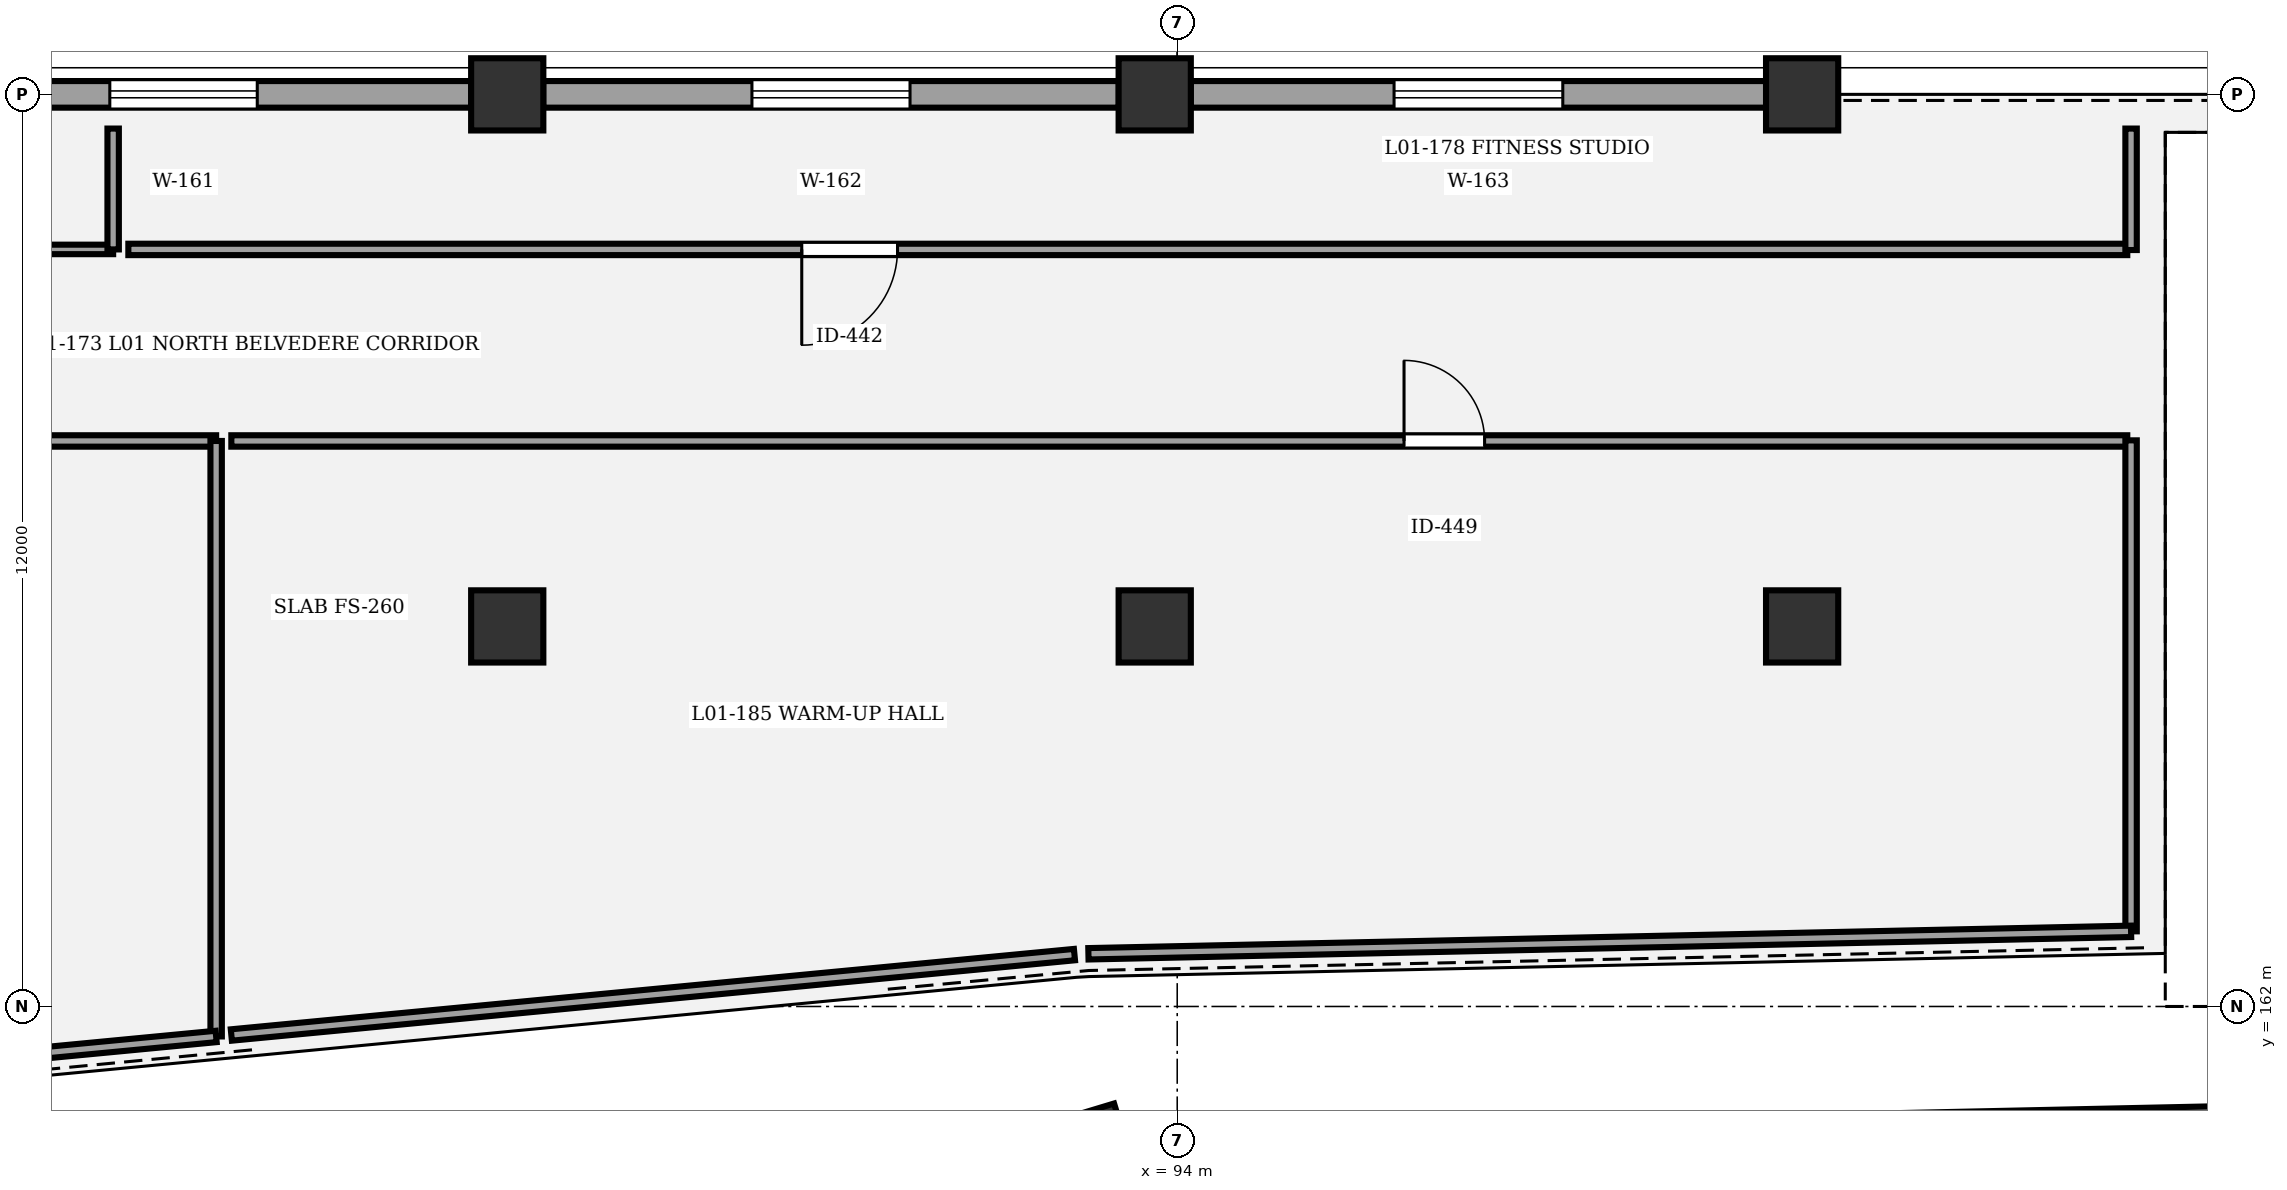
"""IFC4 building model, lengths in metres.
Left out: names, types, materials, properties, quantities, classifications, styles, units other than length and angle.
Written with IfcOpenShell. Run it as: python <this file> out.ifc"""

import sys

from ifc_helpers import new_model, si_unit, direction, frame, frame_2d, origin, origin_2d, place, context, subcontext, project, spatial, rectangle, circle, extrude, element, fill, save


model = new_model("IFC4")
c1 = context("Model", 3, precision=1e-05, world=origin(), true_north=direction((0.0, 1.0)))
c2 = subcontext(c1, "Body", "Model", "MODEL_VIEW")
j1 = project(units=[si_unit("LENGTHUNIT", "METRE"), si_unit("PLANEANGLEUNIT", "RADIAN")], contexts=[c1])
p1 = place(None, origin())
s1 = spatial("IfcSite", under=j1, at=p1, CompositionType="ELEMENT")
p2 = place(p1, origin())
s2 = spatial("IfcBuilding", under=s1, at=p2, CompositionType="ELEMENT")
p3 = place(p2, frame((0.0, 0.0, 5.4)))
s3 = spatial("IfcBuildingStorey", under=s2, at=p3, CompositionType="ELEMENT", Elevation=5.4)
p4 = place(p3, frame((92.885, 160.194, 0.0), z_axis=(0.0, 0.0, 1.0), x_axis=(-0.289198876314, 0.957269037387, 0.0)))
e1 = element("IfcColumn", 1, at=p4, inside=s3, PredefinedType="COLUMN", context=c2, shape_type="SweptSolid", body=[
    extrude(rectangle(XDim=0.85, YDim=0.85, at=origin_2d()), origin(), (0.0, 0.0, 1.0), 4.8),
])
for number, where, z_axis, x_axis in (
    (2, (85.185, 167.0, 0.0), (0.0, 0.0, 1.0), (1.0, 0.0, 0.0)),
    (3, (85.185, 174.0, 0.0), (0.0, 0.0, 1.0), (1.0, 0.0, 0.0)),
    (4, (93.704, 167.0, 0.0), (0.0, 0.0, 1.0), (1.0, 0.0, 0.0)),
    (5, (93.704, 174.0, 0.0), (0.0, 0.0, 1.0), (1.0, 0.0, 0.0)),
    (6, (102.222, 167.0, 0.0), (0.0, 0.0, 1.0), (1.0, 0.0, 0.0)),
    (7, (102.222, 174.0, 0.0), (0.0, 0.0, 1.0), (1.0, 0.0, 0.0)),
):
    element("IfcColumn", number, at=place(p3, frame(where, z_axis=z_axis, x_axis=x_axis)), inside=s3, PredefinedType="COLUMN", context=c2, shape_type="SweptSolid", body=[
        extrude(circle(Radius=0.475, at=origin_2d()), origin(), (0.0, 0.0, 1.0), 4.8),
    ])
p5 = place(p3, frame((114.577, 160.661, 0.0), z_axis=(0.0, 0.0, 1.0), x_axis=(-0.999768218464, -0.021529267282, 0.0)))
e8 = element("IfcWall", 8, at=p5, inside=s3, PredefinedType="STANDARD", context=c2, shape_type="SweptSolid", body=[
    extrude(rectangle(XDim=21.274, YDim=0.35, at=frame_2d((10.637, 0.0))), origin(), (0.0, 0.0, 1.0), 3.57),
])
p6 = place(p5, frame((9.947, 0.0, 0.9)))
e9 = element("IfcOpeningElement", 9, at=p6, cuts=e8, PredefinedType="OPENING", context=c2, shape_type="SweptSolid", body=[
    extrude(rectangle(XDim=1.38, YDim=1.75, at=frame_2d((0.69, 0.875))), frame((0.0, 0.185, 0.0), z_axis=(0.0, -1.0, 0.0), x_axis=(1.0, 0.0, 0.0)), (0.0, 0.0, 1.0), 0.37),
])
p7 = place(p3, frame((77.14, 174.0, 0.0), z_axis=(0.0, 0.0, 1.0), x_axis=(1.0, 0.0, 0.0)))
e10 = element("IfcWall", 10, at=p7, inside=s3, PredefinedType="STANDARD", context=c2, shape_type="SweptSolid", body=[
    extrude(rectangle(XDim=7.572, YDim=0.35, at=frame_2d((3.786, 0.0))), origin(), (0.0, 0.0, 1.0), 3.56),
])
p8 = place(p7, frame((2.816, 0.0, 0.9)))
e11 = element("IfcOpeningElement", 11, at=p8, cuts=e10, PredefinedType="OPENING", context=c2, shape_type="SweptSolid", body=[
    extrude(rectangle(XDim=1.94, YDim=1.95, at=frame_2d((0.97, 0.975))), frame((0.0, 0.185, 0.0), z_axis=(0.0, -1.0, 0.0), x_axis=(1.0, 0.0, 0.0)), (0.0, 0.0, 1.0), 0.37),
])
p9 = place(p3, frame((85.658, 174.0, 0.0), z_axis=(0.0, 0.0, 1.0), x_axis=(1.0, 0.0, 0.0)))
e12 = element("IfcWall", 12, at=p9, inside=s3, PredefinedType="STANDARD", context=c2, shape_type="SweptSolid", body=[
    extrude(rectangle(XDim=7.573, YDim=0.35, at=frame_2d((3.787, 0.0))), origin(), (0.0, 0.0, 1.0), 3.56),
])
p10 = place(p9, frame((2.747, 0.0, 0.9)))
e13 = element("IfcOpeningElement", 13, at=p10, cuts=e12, PredefinedType="OPENING", context=c2, shape_type="SweptSolid", body=[
    extrude(rectangle(XDim=2.08, YDim=1.95, at=frame_2d((1.04, 0.975))), frame((0.0, 0.185, 0.0), z_axis=(0.0, -1.0, 0.0), x_axis=(1.0, 0.0, 0.0)), (0.0, 0.0, 1.0), 0.37),
])
p11 = place(p3, frame((94.177, 174.0, 0.0), z_axis=(0.0, 0.0, 1.0), x_axis=(1.0, 0.0, 0.0)))
e14 = element("IfcWall", 14, at=p11, inside=s3, PredefinedType="STANDARD", context=c2, shape_type="SweptSolid", body=[
    extrude(rectangle(XDim=7.572, YDim=0.35, at=frame_2d((3.786, 0.0))), origin(), (0.0, 0.0, 1.0), 3.56),
])
p12 = place(p11, frame((2.676, 0.0, 0.9)))
e15 = element("IfcOpeningElement", 15, at=p12, cuts=e14, PredefinedType="OPENING", context=c2, shape_type="SweptSolid", body=[
    extrude(rectangle(XDim=2.22, YDim=1.95, at=frame_2d((1.11, 0.975))), frame((0.0, 0.185, 0.0), z_axis=(0.0, -1.0, 0.0), x_axis=(1.0, 0.0, 0.0)), (0.0, 0.0, 1.0), 0.37),
])
p13 = place(p3, frame((80.0, 171.96, 0.0), z_axis=(0.0, 0.0, 1.0), x_axis=(-1.0, 0.0, 0.0)))
e16 = element("IfcWall", 16, at=p13, inside=s3, PredefinedType="PARTITIONING", context=c2, shape_type="SweptSolid", body=[
    extrude(rectangle(XDim=26.1, YDim=0.125, at=frame_2d((13.05, 0.0))), origin(), (0.0, 0.0, 1.0), 3.55),
])
p14 = place(p13, frame((16.076, 0.0, 0.0)))
e17 = element("IfcOpeningElement", 17, at=p14, cuts=e16, PredefinedType="OPENING", context=c2, shape_type="SweptSolid", body=[
    extrude(rectangle(XDim=1.22, YDim=2.1, at=frame_2d((0.61, 1.05))), frame((0.0, 0.073, 0.0), z_axis=(0.0, -1.0, 0.0), x_axis=(1.0, 0.0, 0.0)), (0.0, 0.0, 1.0), 0.145),
])
p15 = place(p3, frame((106.5, 171.96, 0.0), z_axis=(0.0, 0.0, 1.0), x_axis=(-1.0, 0.0, 0.0)))
e18 = element("IfcWall", 18, at=p15, inside=s3, PredefinedType="PARTITIONING", context=c2, shape_type="SweptSolid", body=[
    extrude(rectangle(XDim=26.3, YDim=0.15, at=frame_2d((13.15, 0.0))), origin(), (0.0, 0.0, 1.0), 3.55),
])
p16 = place(p15, frame((16.18, 0.0, 0.0)))
e19 = element("IfcOpeningElement", 19, at=p16, cuts=e18, PredefinedType="OPENING", context=c2, shape_type="SweptSolid", body=[
    extrude(rectangle(XDim=1.26, YDim=2.1, at=frame_2d((0.63, 1.05))), frame((0.0, 0.085, 0.0), z_axis=(0.0, -1.0, 0.0), x_axis=(1.0, 0.0, 0.0)), (0.0, 0.0, 1.0), 0.17),
])
p17 = place(p3, frame((56.36, 169.44, 0.0), z_axis=(0.0, 0.0, 1.0), x_axis=(1.0, 0.0, 0.0)))
e20 = element("IfcWall", 20, at=p17, inside=s3, PredefinedType="PARTITIONING", context=c2, shape_type="SweptSolid", body=[
    extrude(rectangle(XDim=24.995, YDim=0.15, at=frame_2d((12.498, 0.0))), origin(), (0.0, 0.0, 1.0), 3.55),
])
p18 = place(p17, frame((15.488, 0.0, 0.0)))
e21 = element("IfcOpeningElement", 21, at=p18, cuts=e20, PredefinedType="OPENING", context=c2, shape_type="SweptSolid", body=[
    extrude(rectangle(XDim=1.02, YDim=2.2, at=frame_2d((0.51, 1.1))), frame((0.0, 0.085, 0.0), z_axis=(0.0, -1.0, 0.0), x_axis=(1.0, 0.0, 0.0)), (0.0, 0.0, 1.0), 0.17),
])
p19 = place(p3, frame((81.555, 169.44, 0.0), z_axis=(0.0, 0.0, 1.0), x_axis=(1.0, 0.0, 0.0)))
e22 = element("IfcWall", 22, at=p19, inside=s3, PredefinedType="PARTITIONING", context=c2, shape_type="SweptSolid", body=[
    extrude(rectangle(XDim=24.945, YDim=0.15, at=frame_2d((12.473, 0.0))), origin(), (0.0, 0.0, 1.0), 3.55),
])
p20 = place(p19, frame((15.429, 0.0, 0.0)))
e23 = element("IfcOpeningElement", 23, at=p20, cuts=e22, PredefinedType="OPENING", context=c2, shape_type="SweptSolid", body=[
    extrude(rectangle(XDim=1.06, YDim=2.2, at=frame_2d((0.53, 1.1))), frame((0.0, 0.085, 0.0), z_axis=(0.0, -1.0, 0.0), x_axis=(1.0, 0.0, 0.0)), (0.0, 0.0, 1.0), 0.17),
])
p21 = place(p3, frame((80.0, 173.55, 0.0), z_axis=(0.0, 0.0, 1.0), x_axis=(0.0, -1.0, 0.0)))
e24 = element("IfcWall", 24, at=p21, inside=s3, PredefinedType="PARTITIONING", context=c2, shape_type="SweptSolid", body=[
    extrude(rectangle(XDim=1.59, YDim=0.15, at=frame_2d((0.795, 0.0))), origin(), (0.0, 0.0, 1.0), 3.55),
])
p22 = place(p3, frame((106.55, 173.55, 0.0), z_axis=(0.0, 0.0, 1.0), x_axis=(0.0, -1.0, 0.0)))
e25 = element("IfcWall", 25, at=p22, inside=s3, PredefinedType="PARTITIONING", context=c2, shape_type="SweptSolid", body=[
    extrude(rectangle(XDim=1.598, YDim=0.15, at=frame_2d((0.799, 0.0))), origin(), (0.0, 0.0, 1.0), 3.55),
])
p23 = place(p3, frame((81.355, 169.44, 0.0), z_axis=(0.0, 0.0, 1.0), x_axis=(0.0, -1.0, 0.0)))
e26 = element("IfcWall", 26, at=p23, inside=s3, PredefinedType="PARTITIONING", context=c2, shape_type="SweptSolid", body=[
    extrude(rectangle(XDim=7.834, YDim=0.15, at=frame_2d((3.917, 0.0))), origin(), (0.0, 0.0, 1.0), 3.55),
])
p24 = place(p3, frame((81.355, 161.606, 0.0), z_axis=(0.0, 0.0, 1.0), x_axis=(-0.995481155674, -0.094959300221, 0.0)))
e27 = element("IfcWall", 27, at=p24, inside=s3, PredefinedType="PARTITIONING", context=c2, shape_type="SweptSolid", body=[
    extrude(rectangle(XDim=3.682, YDim=0.15, at=frame_2d((1.841, 0.0))), origin(), (0.0, 0.0, 1.0), 3.55),
])
p25 = place(p3, frame((92.648, 162.683, 0.0), z_axis=(0.0, 0.0, 1.0), x_axis=(-0.995483944756, -0.094930057059, 0.0)))
e28 = element("IfcWall", 28, at=p25, inside=s3, PredefinedType="PARTITIONING", context=c2, shape_type="SweptSolid", body=[
    extrude(rectangle(XDim=11.144, YDim=0.15, at=frame_2d((5.572, 0.0))), origin(), (0.0, 0.0, 1.0), 3.55),
])
p26 = place(p3, frame((106.55, 169.448, 0.0), z_axis=(0.0, 0.0, 1.0), x_axis=(0.0, -1.0, 0.0)))
e29 = element("IfcWall", 29, at=p26, inside=s3, PredefinedType="PARTITIONING", context=c2, shape_type="SweptSolid", body=[
    extrude(rectangle(XDim=6.46, YDim=0.15, at=frame_2d((3.23, 0.0))), origin(), (0.0, 0.0, 1.0), 3.55),
])
p27 = place(p3, frame((106.55, 162.989, 0.0), z_axis=(0.0, 0.0, 1.0), x_axis=(-0.999768230535, -0.021528706714, 0.0)))
e30 = element("IfcWall", 30, at=p27, inside=s3, PredefinedType="PARTITIONING", context=c2, shape_type="SweptSolid", body=[
    extrude(rectangle(XDim=13.722, YDim=0.15, at=frame_2d((6.861, 0.0))), origin(), (0.0, 0.0, 1.0), 3.55),
])
p28 = place(p8, origin())
e31 = element("IfcWindow", 31, at=p28, inside=s3, PartitioningType="SINGLE_PANEL", PredefinedType="WINDOW", context=c2, shape_type="SweptSolid", body=[
    extrude(rectangle(XDim=1.94, YDim=1.95, at=frame_2d((0.97, 0.975))), frame((0.0, 0.03, 0.0), z_axis=(0.0, -1.0, 0.0), x_axis=(1.0, 0.0, 0.0)), (0.0, 0.0, 1.0), 0.06),
])
fill(e11, e31)
p29 = place(p10, origin())
e32 = element("IfcWindow", 32, at=p29, inside=s3, PartitioningType="SINGLE_PANEL", PredefinedType="WINDOW", context=c2, shape_type="SweptSolid", body=[
    extrude(rectangle(XDim=2.08, YDim=1.95, at=frame_2d((1.04, 0.975))), frame((0.0, 0.03, 0.0), z_axis=(0.0, -1.0, 0.0), x_axis=(1.0, 0.0, 0.0)), (0.0, 0.0, 1.0), 0.06),
])
fill(e13, e32)
p30 = place(p12, origin())
e33 = element("IfcWindow", 33, at=p30, inside=s3, PartitioningType="SINGLE_PANEL", PredefinedType="WINDOW", context=c2, shape_type="SweptSolid", body=[
    extrude(rectangle(XDim=2.22, YDim=1.95, at=frame_2d((1.11, 0.975))), frame((0.0, 0.03, 0.0), z_axis=(0.0, -1.0, 0.0), x_axis=(1.0, 0.0, 0.0)), (0.0, 0.0, 1.0), 0.06),
])
fill(e15, e33)
p31 = place(p16, origin())
e34 = element("IfcDoor", 34, at=p31, inside=s3, OperationType="SINGLE_SWING_RIGHT", PredefinedType="DOOR", context=c2, shape_type="SweptSolid", body=[
    extrude(rectangle(XDim=1.26, YDim=2.1, at=frame_2d((0.63, 1.05))), frame((0.0, 0.025, 0.0), z_axis=(0.0, -1.0, 0.0), x_axis=(1.0, 0.0, 0.0)), (0.0, 0.0, 1.0), 0.05),
])
fill(e19, e34)
p32 = place(p20, origin())
e35 = element("IfcDoor", 35, at=p32, inside=s3, OperationType="SINGLE_SWING_LEFT", PredefinedType="DOOR", context=c2, shape_type="SweptSolid", body=[
    extrude(rectangle(XDim=1.06, YDim=2.2, at=frame_2d((0.53, 1.1))), frame((0.0, 0.025, 0.0), z_axis=(0.0, -1.0, 0.0), x_axis=(1.0, 0.0, 0.0)), (0.0, 0.0, 1.0), 0.05),
])
fill(e23, e35)
save(model, sys.argv[1])
